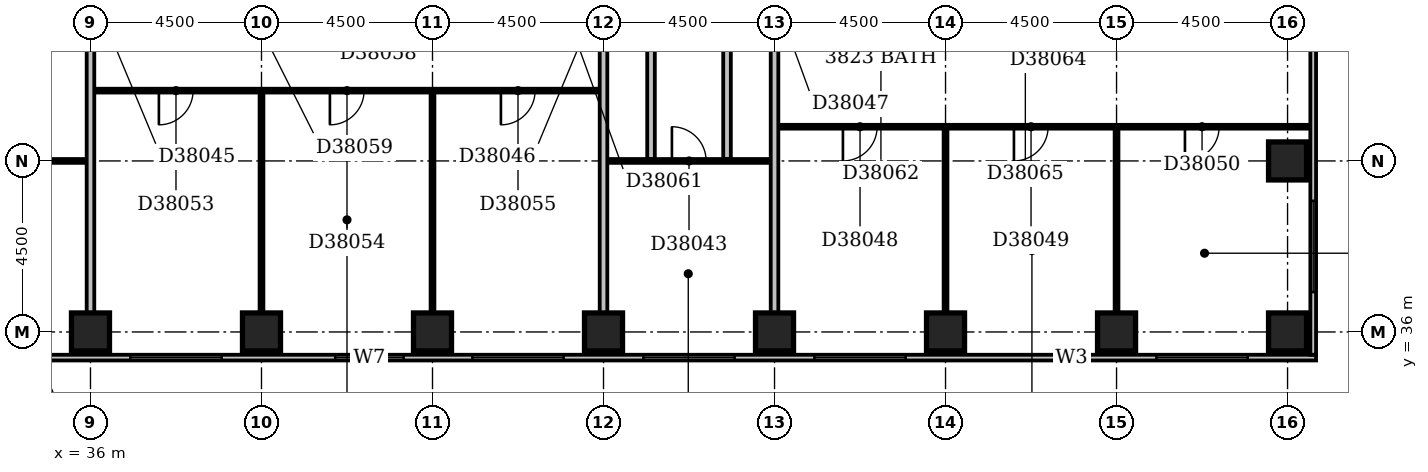
"""IFC4 building model, lengths in metres.
Left out: names, types, materials, properties, quantities, classifications, styles, units other than length and angle.
Written with IfcOpenShell. Run it as: python <this file> out.ifc"""

import sys

from ifc_helpers import new_model, si_unit, direction, frame, frame_2d, origin, origin_2d, place, context, subcontext, project, spatial, rectangle, extrude, element, fill, save


model = new_model("IFC4")
c1 = context("Model", 3, precision=1e-05, world=origin(), true_north=direction((0.0, 1.0)))
c2 = subcontext(c1, "Body", "Model", "MODEL_VIEW")
j1 = project(units=[si_unit("LENGTHUNIT", "METRE"), si_unit("PLANEANGLEUNIT", "RADIAN")], contexts=[c1])
p1 = place(None, origin())
s1 = spatial("IfcSite", under=j1, at=p1, CompositionType="ELEMENT")
p2 = place(p1, origin())
s2 = spatial("IfcBuilding", under=s1, at=p2, CompositionType="ELEMENT")
p3 = place(p2, frame((0.0, 0.0, 152.0)))
s3 = spatial("IfcBuildingStorey", under=s2, at=p3, CompositionType="ELEMENT", Elevation=152.0)
for number, where, z_axis, x_axis in (
    (1, (36.0, 36.0, -0.3), (0.0, 0.0, 1.0), (1.0, 0.0, 0.0)),
    (2, (40.5, 36.0, -0.3), (0.0, 0.0, 1.0), (1.0, 0.0, 0.0)),
    (3, (45.0, 36.0, -0.3), (0.0, 0.0, 1.0), (1.0, 0.0, 0.0)),
    (4, (49.5, 36.0, -0.3), (0.0, 0.0, 1.0), (1.0, 0.0, 0.0)),
    (5, (54.0, 36.0, -0.3), (0.0, 0.0, 1.0), (1.0, 0.0, 0.0)),
    (6, (58.5, 36.0, -0.3), (0.0, 0.0, 1.0), (1.0, 0.0, 0.0)),
    (7, (63.0, 36.0, -0.3), (0.0, 0.0, 1.0), (1.0, 0.0, 0.0)),
    (8, (67.5, 36.0, -0.3), (0.0, 0.0, 1.0), (1.0, 0.0, 0.0)),
    (9, (67.5, 40.5, -0.3), (0.0, 0.0, 1.0), (1.0, 0.0, 0.0)),
):
    element("IfcColumn", number, at=place(p3, frame(where, z_axis=z_axis, x_axis=x_axis)), inside=s3, PredefinedType="COLUMN", context=c2, shape_type="SweptSolid", body=[
        extrude(rectangle(XDim=1.0, YDim=1.0, at=origin_2d()), origin(), (0.0, 0.0, 1.0), 3.6),
    ])
p4 = place(p3, frame((23.1, 35.325, 0.0), z_axis=(0.0, 0.0, 1.0), x_axis=(1.0, 0.0, 0.0)))
e10 = element("IfcWall", 10, at=p4, inside=s3, PredefinedType="STANDARD", context=c2, shape_type="SweptSolid", body=[
    extrude(rectangle(XDim=45.15, YDim=0.15, at=frame_2d((22.575, 0.0))), origin(), (0.0, 0.0, 1.0), 2.7),
])
p5 = place(p4, frame((0.45, 0.0, 0.6)))
e11 = element("IfcOpeningElement", 11, at=p5, cuts=e10, PredefinedType="OPENING", context=c2, shape_type="SweptSolid", body=[
    extrude(rectangle(XDim=2.4, YDim=1.8, at=frame_2d((1.2, 0.9))), frame((0.0, 0.087, 0.0), z_axis=(0.0, -1.0, 0.0), x_axis=(1.0, 0.0, 0.0)), (0.0, 0.0, 1.0), 0.174),
])
p6 = place(p4, frame((4.738, 0.0, 0.6)))
e12 = element("IfcOpeningElement", 12, at=p6, cuts=e10, PredefinedType="OPENING", context=c2, shape_type="SweptSolid", body=[
    extrude(rectangle(XDim=2.1, YDim=1.8, at=frame_2d((1.05, 0.9))), frame((0.0, 0.087, 0.0), z_axis=(0.0, -1.0, 0.0), x_axis=(1.0, 0.0, 0.0)), (0.0, 0.0, 1.0), 0.174),
])
p7 = place(p4, frame((9.45, 0.0, 0.6)))
e13 = element("IfcOpeningElement", 13, at=p7, cuts=e10, PredefinedType="OPENING", context=c2, shape_type="SweptSolid", body=[
    extrude(rectangle(XDim=2.4, YDim=1.8, at=frame_2d((1.2, 0.9))), frame((0.0, 0.087, 0.0), z_axis=(0.0, -1.0, 0.0), x_axis=(1.0, 0.0, 0.0)), (0.0, 0.0, 1.0), 0.174),
])
p8 = place(p4, frame((13.95, 0.0, 0.6)))
e14 = element("IfcOpeningElement", 14, at=p8, cuts=e10, PredefinedType="OPENING", context=c2, shape_type="SweptSolid", body=[
    extrude(rectangle(XDim=2.4, YDim=1.8, at=frame_2d((1.2, 0.9))), frame((0.0, 0.087, 0.0), z_axis=(0.0, -1.0, 0.0), x_axis=(1.0, 0.0, 0.0)), (0.0, 0.0, 1.0), 0.174),
])
p9 = place(p4, frame((19.34, 0.0, 0.6)))
e15 = element("IfcOpeningElement", 15, at=p9, cuts=e10, PredefinedType="OPENING", context=c2, shape_type="SweptSolid", body=[
    extrude(rectangle(XDim=1.8, YDim=1.8, at=frame_2d((0.9, 0.9))), frame((0.0, 0.087, 0.0), z_axis=(0.0, -1.0, 0.0), x_axis=(1.0, 0.0, 0.0)), (0.0, 0.0, 1.0), 0.174),
])
p10 = place(p4, frame((22.95, 0.0, 0.6)))
e16 = element("IfcOpeningElement", 16, at=p10, cuts=e10, PredefinedType="OPENING", context=c2, shape_type="SweptSolid", body=[
    extrude(rectangle(XDim=2.4, YDim=1.8, at=frame_2d((1.2, 0.9))), frame((0.0, 0.087, 0.0), z_axis=(0.0, -1.0, 0.0), x_axis=(1.0, 0.0, 0.0)), (0.0, 0.0, 1.0), 0.174),
])
p11 = place(p4, frame((27.45, 0.0, 0.6)))
e17 = element("IfcOpeningElement", 17, at=p11, cuts=e10, PredefinedType="OPENING", context=c2, shape_type="SweptSolid", body=[
    extrude(rectangle(XDim=2.4, YDim=1.8, at=frame_2d((1.2, 0.9))), frame((0.0, 0.087, 0.0), z_axis=(0.0, -1.0, 0.0), x_axis=(1.0, 0.0, 0.0)), (0.0, 0.0, 1.0), 0.174),
])
p12 = place(p4, frame((31.95, 0.0, 0.6)))
e18 = element("IfcOpeningElement", 18, at=p12, cuts=e10, PredefinedType="OPENING", context=c2, shape_type="SweptSolid", body=[
    extrude(rectangle(XDim=2.4, YDim=1.8, at=frame_2d((1.2, 0.9))), frame((0.0, 0.087, 0.0), z_axis=(0.0, -1.0, 0.0), x_axis=(1.0, 0.0, 0.0)), (0.0, 0.0, 1.0), 0.174),
])
p13 = place(p4, frame((38.27, 0.0, 0.6)))
e19 = element("IfcOpeningElement", 19, at=p13, cuts=e10, PredefinedType="OPENING", context=c2, shape_type="SweptSolid", body=[
    extrude(rectangle(XDim=0.9, YDim=1.8, at=frame_2d((0.45, 0.9))), frame((0.0, 0.087, 0.0), z_axis=(0.0, -1.0, 0.0), x_axis=(1.0, 0.0, 0.0)), (0.0, 0.0, 1.0), 0.174),
])
p14 = place(p4, frame((40.95, 0.0, 0.6)))
e20 = element("IfcOpeningElement", 20, at=p14, cuts=e10, PredefinedType="OPENING", context=c2, shape_type="SweptSolid", body=[
    extrude(rectangle(XDim=2.4, YDim=1.8, at=frame_2d((1.2, 0.9))), frame((0.0, 0.087, 0.0), z_axis=(0.0, -1.0, 0.0), x_axis=(1.0, 0.0, 0.0)), (0.0, 0.0, 1.0), 0.174),
])
p15 = place(p3, frame((68.175, 35.4, 0.0), z_axis=(0.0, 0.0, 1.0), x_axis=(0.0, 1.0, 0.0)))
e21 = element("IfcWall", 21, at=p15, inside=s3, PredefinedType="STANDARD", context=c2, shape_type="SweptSolid", body=[
    extrude(rectangle(XDim=23.85, YDim=0.15, at=frame_2d((11.925, 0.0))), origin(), (0.0, 0.0, 1.0), 2.7),
])
p16 = place(p15, frame((1.65, 0.0, 0.6)))
e22 = element("IfcOpeningElement", 22, at=p16, cuts=e21, PredefinedType="OPENING", context=c2, shape_type="SweptSolid", body=[
    extrude(rectangle(XDim=2.4, YDim=1.8, at=frame_2d((1.2, 0.9))), frame((0.0, 0.087, 0.0), z_axis=(0.0, -1.0, 0.0), x_axis=(1.0, 0.0, 0.0)), (0.0, 0.0, 1.0), 0.174),
])
p17 = place(p15, frame((10.65, 0.0, 0.6)))
e23 = element("IfcOpeningElement", 23, at=p17, cuts=e21, PredefinedType="OPENING", context=c2, shape_type="SweptSolid", body=[
    extrude(rectangle(XDim=2.4, YDim=1.8, at=frame_2d((1.2, 0.9))), frame((0.0, 0.087, 0.0), z_axis=(0.0, -1.0, 0.0), x_axis=(1.0, 0.0, 0.0)), (0.0, 0.0, 1.0), 0.174),
])
p18 = place(p15, frame((19.65, 0.0, 0.6)))
e24 = element("IfcOpeningElement", 24, at=p18, cuts=e21, PredefinedType="OPENING", context=c2, shape_type="SweptSolid", body=[
    extrude(rectangle(XDim=2.4, YDim=1.8, at=frame_2d((1.2, 0.9))), frame((0.0, 0.087, 0.0), z_axis=(0.0, -1.0, 0.0), x_axis=(1.0, 0.0, 0.0)), (0.0, 0.0, 1.0), 0.174),
])
p19 = place(p3, frame((36.0, 36.5, 0.0), z_axis=(0.0, 0.0, 1.0), x_axis=(0.0, 1.0, 0.0)))
e25 = element("IfcWall", 25, at=p19, inside=s3, PredefinedType="PARTITIONING", context=c2, shape_type="SweptSolid", body=[
    extrude(rectangle(XDim=12.9, YDim=0.2, at=frame_2d((6.45, 0.0))), origin(), (0.0, 0.0, 1.0), 2.4),
])
p20 = place(p3, frame((40.5, 36.5, 0.0), z_axis=(0.0, 0.0, 1.0), x_axis=(0.0, 1.0, 0.0)))
e26 = element("IfcWall", 26, at=p20, inside=s3, PredefinedType="PARTITIONING", context=c2, shape_type="SweptSolid", body=[
    extrude(rectangle(XDim=5.8, YDim=0.1, at=frame_2d((2.9, 0.0))), origin(), (0.0, 0.0, 1.0), 3.3),
])
p21 = place(p3, frame((45.0, 36.5, 0.0), z_axis=(0.0, 0.0, 1.0), x_axis=(0.0, 1.0, 0.0)))
e27 = element("IfcWall", 27, at=p21, inside=s3, PredefinedType="PARTITIONING", context=c2, shape_type="SweptSolid", body=[
    extrude(rectangle(XDim=5.8, YDim=0.1, at=frame_2d((2.9, 0.0))), origin(), (0.0, 0.0, 1.0), 2.6),
])
p22 = place(p3, frame((49.5, 36.5, 0.0), z_axis=(0.0, 0.0, 1.0), x_axis=(0.0, 1.0, 0.0)))
e28 = element("IfcWall", 28, at=p22, inside=s3, PredefinedType="PARTITIONING", context=c2, shape_type="SweptSolid", body=[
    extrude(rectangle(XDim=12.9, YDim=0.2, at=frame_2d((6.45, 0.0))), origin(), (0.0, 0.0, 1.0), 3.3),
])
p23 = place(p3, frame((54.0, 36.5, 0.0), z_axis=(0.0, 0.0, 1.0), x_axis=(0.0, 1.0, 0.0)))
e29 = element("IfcWall", 29, at=p23, inside=s3, PredefinedType="PARTITIONING", context=c2, shape_type="SweptSolid", body=[
    extrude(rectangle(XDim=12.9, YDim=0.2, at=frame_2d((6.45, 0.0))), origin(), (0.0, 0.0, 1.0), 2.6),
])
p24 = place(p3, frame((58.5, 36.5, 0.0), z_axis=(0.0, 0.0, 1.0), x_axis=(0.0, 1.0, 0.0)))
e30 = element("IfcWall", 30, at=p24, inside=s3, PredefinedType="PARTITIONING", context=c2, shape_type="SweptSolid", body=[
    extrude(rectangle(XDim=4.85, YDim=0.1, at=frame_2d((2.425, 0.0))), origin(), (0.0, 0.0, 1.0), 3.3),
])
p25 = place(p3, frame((63.0, 36.5, 0.0), z_axis=(0.0, 0.0, 1.0), x_axis=(0.0, 1.0, 0.0)))
e31 = element("IfcWall", 31, at=p25, inside=s3, PredefinedType="PARTITIONING", context=c2, shape_type="SweptSolid", body=[
    extrude(rectangle(XDim=4.85, YDim=0.1, at=frame_2d((2.425, 0.0))), origin(), (0.0, 0.0, 1.0), 2.4),
])
p26 = place(p3, frame((31.6, 40.5, 0.0), z_axis=(0.0, 0.0, 1.0), x_axis=(1.0, 0.0, 0.0)))
e32 = element("IfcWall", 32, at=p26, inside=s3, PredefinedType="PARTITIONING", context=c2, shape_type="SweptSolid", body=[
    extrude(rectangle(XDim=4.3, YDim=0.1, at=frame_2d((2.15, 0.0))), origin(), (0.0, 0.0, 1.0), 3.3),
])
p27 = place(p26, frame((1.7, 0.0, 0.0)))
e33 = element("IfcOpeningElement", 33, at=p27, cuts=e32, PredefinedType="OPENING", context=c2, shape_type="SweptSolid", body=[
    extrude(rectangle(XDim=0.9, YDim=2.1, at=frame_2d((0.45, 1.05))), frame((0.0, 0.062, 0.0), z_axis=(0.0, -1.0, 0.0), x_axis=(1.0, 0.0, 0.0)), (0.0, 0.0, 1.0), 0.124),
])
p28 = place(p3, frame((49.6, 40.5, 0.0), z_axis=(0.0, 0.0, 1.0), x_axis=(1.0, 0.0, 0.0)))
e34 = element("IfcWall", 34, at=p28, inside=s3, PredefinedType="PARTITIONING", context=c2, shape_type="SweptSolid", body=[
    extrude(rectangle(XDim=4.3, YDim=0.1, at=frame_2d((2.15, 0.0))), origin(), (0.0, 0.0, 1.0), 3.3),
])
p29 = place(p28, frame((1.7, 0.0, 0.0)))
e35 = element("IfcOpeningElement", 35, at=p29, cuts=e34, PredefinedType="OPENING", context=c2, shape_type="SweptSolid", body=[
    extrude(rectangle(XDim=0.9, YDim=2.1, at=frame_2d((0.45, 1.05))), frame((0.0, 0.062, 0.0), z_axis=(0.0, -1.0, 0.0), x_axis=(1.0, 0.0, 0.0)), (0.0, 0.0, 1.0), 0.124),
])
p30 = place(p3, frame((50.75, 40.55, 0.0), z_axis=(0.0, 0.0, 1.0), x_axis=(0.0, 1.0, 0.0)))
e36 = element("IfcWall", 36, at=p30, inside=s3, PredefinedType="PARTITIONING", context=c2, shape_type="SweptSolid", body=[
    extrude(rectangle(XDim=8.95, YDim=0.2, at=frame_2d((4.475, 0.0))), origin(), (0.0, 0.0, 1.0), 3.3),
])
p31 = place(p30, frame((5.55, 0.0, 0.0)))
e37 = element("IfcOpeningElement", 37, at=p31, cuts=e36, PredefinedType="OPENING", context=c2, shape_type="SweptSolid", body=[
    extrude(rectangle(XDim=0.8, YDim=2.1, at=frame_2d((0.4, 1.05))), frame((0.0, 0.112, 0.0), z_axis=(0.0, -1.0, 0.0), x_axis=(1.0, 0.0, 0.0)), (0.0, 0.0, 1.0), 0.224),
])
p32 = place(p3, frame((52.75, 40.55, 0.0), z_axis=(0.0, 0.0, 1.0), x_axis=(0.0, 1.0, 0.0)))
e38 = element("IfcWall", 38, at=p32, inside=s3, PredefinedType="PARTITIONING", context=c2, shape_type="SweptSolid", body=[
    extrude(rectangle(XDim=8.95, YDim=0.2, at=frame_2d((4.475, 0.0))), origin(), (0.0, 0.0, 1.0), 3.3),
])
p33 = place(p32, frame((5.55, 0.0, 0.0)))
e39 = element("IfcOpeningElement", 39, at=p33, cuts=e38, PredefinedType="OPENING", context=c2, shape_type="SweptSolid", body=[
    extrude(rectangle(XDim=0.8, YDim=2.1, at=frame_2d((0.4, 1.05))), frame((0.0, 0.112, 0.0), z_axis=(0.0, -1.0, 0.0), x_axis=(1.0, 0.0, 0.0)), (0.0, 0.0, 1.0), 0.224),
])
p34 = place(p3, frame((54.1, 41.4, 0.0), z_axis=(0.0, 0.0, 1.0), x_axis=(1.0, 0.0, 0.0)))
e40 = element("IfcWall", 40, at=p34, inside=s3, PredefinedType="PARTITIONING", context=c2, shape_type="SweptSolid", body=[
    extrude(rectangle(XDim=14.0, YDim=0.1, at=frame_2d((7.0, 0.0))), origin(), (0.0, 0.0, 1.0), 3.3),
])
p35 = place(p34, frame((1.7, 0.0, 0.0)))
e41 = element("IfcOpeningElement", 41, at=p35, cuts=e40, PredefinedType="OPENING", context=c2, shape_type="SweptSolid", body=[
    extrude(rectangle(XDim=0.9, YDim=2.1, at=frame_2d((0.45, 1.05))), frame((0.0, 0.062, 0.0), z_axis=(0.0, -1.0, 0.0), x_axis=(1.0, 0.0, 0.0)), (0.0, 0.0, 1.0), 0.124),
])
p36 = place(p34, frame((6.2, 0.0, 0.0)))
e42 = element("IfcOpeningElement", 42, at=p36, cuts=e40, PredefinedType="OPENING", context=c2, shape_type="SweptSolid", body=[
    extrude(rectangle(XDim=0.9, YDim=2.1, at=frame_2d((0.45, 1.05))), frame((0.0, 0.062, 0.0), z_axis=(0.0, -1.0, 0.0), x_axis=(1.0, 0.0, 0.0)), (0.0, 0.0, 1.0), 0.124),
])
p37 = place(p34, frame((10.7, 0.0, 0.0)))
e43 = element("IfcOpeningElement", 43, at=p37, cuts=e40, PredefinedType="OPENING", context=c2, shape_type="SweptSolid", body=[
    extrude(rectangle(XDim=0.9, YDim=2.1, at=frame_2d((0.45, 1.05))), frame((0.0, 0.062, 0.0), z_axis=(0.0, -1.0, 0.0), x_axis=(1.0, 0.0, 0.0)), (0.0, 0.0, 1.0), 0.124),
])
p38 = place(p3, frame((36.1, 42.35, 0.0), z_axis=(0.0, 0.0, 1.0), x_axis=(1.0, 0.0, 0.0)))
e44 = element("IfcWall", 44, at=p38, inside=s3, PredefinedType="PARTITIONING", context=c2, shape_type="SweptSolid", body=[
    extrude(rectangle(XDim=13.3, YDim=0.1, at=frame_2d((6.65, 0.0))), origin(), (0.0, 0.0, 1.0), 3.3),
])
p39 = place(p38, frame((1.7, 0.0, 0.0)))
e45 = element("IfcOpeningElement", 45, at=p39, cuts=e44, PredefinedType="OPENING", context=c2, shape_type="SweptSolid", body=[
    extrude(rectangle(XDim=0.9, YDim=2.1, at=frame_2d((0.45, 1.05))), frame((0.0, 0.062, 0.0), z_axis=(0.0, -1.0, 0.0), x_axis=(1.0, 0.0, 0.0)), (0.0, 0.0, 1.0), 0.124),
])
p40 = place(p38, frame((6.2, 0.0, 0.0)))
e46 = element("IfcOpeningElement", 46, at=p40, cuts=e44, PredefinedType="OPENING", context=c2, shape_type="SweptSolid", body=[
    extrude(rectangle(XDim=0.9, YDim=2.1, at=frame_2d((0.45, 1.05))), frame((0.0, 0.062, 0.0), z_axis=(0.0, -1.0, 0.0), x_axis=(1.0, 0.0, 0.0)), (0.0, 0.0, 1.0), 0.124),
])
p41 = place(p38, frame((10.7, 0.0, 0.0)))
e47 = element("IfcOpeningElement", 47, at=p41, cuts=e44, PredefinedType="OPENING", context=c2, shape_type="SweptSolid", body=[
    extrude(rectangle(XDim=0.9, YDim=2.1, at=frame_2d((0.45, 1.05))), frame((0.0, 0.062, 0.0), z_axis=(0.0, -1.0, 0.0), x_axis=(1.0, 0.0, 0.0)), (0.0, 0.0, 1.0), 0.124),
])
p42 = place(p8, origin())
e48 = element("IfcWindow", 48, at=p42, inside=s3, PartitioningType="SINGLE_PANEL", PredefinedType="WINDOW", context=c2, shape_type="SweptSolid", body=[
    extrude(rectangle(XDim=2.4, YDim=1.8, at=frame_2d((1.2, 0.9))), frame((0.0, 0.03, 0.0), z_axis=(0.0, -1.0, 0.0), x_axis=(1.0, 0.0, 0.0)), (0.0, 0.0, 1.0), 0.06),
])
fill(e14, e48)
p43 = place(p9, origin())
e49 = element("IfcWindow", 49, at=p43, inside=s3, PartitioningType="SINGLE_PANEL", PredefinedType="WINDOW", context=c2, shape_type="SweptSolid", body=[
    extrude(rectangle(XDim=1.8, YDim=1.8, at=frame_2d((0.9, 0.9))), frame((0.0, 0.03, 0.0), z_axis=(0.0, -1.0, 0.0), x_axis=(1.0, 0.0, 0.0)), (0.0, 0.0, 1.0), 0.06),
])
fill(e15, e49)
p44 = place(p10, origin())
e50 = element("IfcWindow", 50, at=p44, inside=s3, PartitioningType="SINGLE_PANEL", PredefinedType="WINDOW", context=c2, shape_type="SweptSolid", body=[
    extrude(rectangle(XDim=2.4, YDim=1.8, at=frame_2d((1.2, 0.9))), frame((0.0, 0.03, 0.0), z_axis=(0.0, -1.0, 0.0), x_axis=(1.0, 0.0, 0.0)), (0.0, 0.0, 1.0), 0.06),
])
fill(e16, e50)
p45 = place(p11, origin())
e51 = element("IfcWindow", 51, at=p45, inside=s3, PartitioningType="SINGLE_PANEL", PredefinedType="WINDOW", context=c2, shape_type="SweptSolid", body=[
    extrude(rectangle(XDim=2.4, YDim=1.8, at=frame_2d((1.2, 0.9))), frame((0.0, 0.03, 0.0), z_axis=(0.0, -1.0, 0.0), x_axis=(1.0, 0.0, 0.0)), (0.0, 0.0, 1.0), 0.06),
])
fill(e17, e51)
p46 = place(p12, origin())
e52 = element("IfcWindow", 52, at=p46, inside=s3, PartitioningType="SINGLE_PANEL", PredefinedType="WINDOW", context=c2, shape_type="SweptSolid", body=[
    extrude(rectangle(XDim=2.4, YDim=1.8, at=frame_2d((1.2, 0.9))), frame((0.0, 0.03, 0.0), z_axis=(0.0, -1.0, 0.0), x_axis=(1.0, 0.0, 0.0)), (0.0, 0.0, 1.0), 0.06),
])
fill(e18, e52)
p47 = place(p13, origin())
e53 = element("IfcWindow", 53, at=p47, inside=s3, PartitioningType="SINGLE_PANEL", PredefinedType="WINDOW", context=c2, shape_type="SweptSolid", body=[
    extrude(rectangle(XDim=0.9, YDim=1.8, at=frame_2d((0.45, 0.9))), frame((0.0, 0.03, 0.0), z_axis=(0.0, -1.0, 0.0), x_axis=(1.0, 0.0, 0.0)), (0.0, 0.0, 1.0), 0.06),
])
fill(e19, e53)
p48 = place(p14, origin())
e54 = element("IfcWindow", 54, at=p48, inside=s3, PartitioningType="SINGLE_PANEL", PredefinedType="WINDOW", context=c2, shape_type="SweptSolid", body=[
    extrude(rectangle(XDim=2.4, YDim=1.8, at=frame_2d((1.2, 0.9))), frame((0.0, 0.03, 0.0), z_axis=(0.0, -1.0, 0.0), x_axis=(1.0, 0.0, 0.0)), (0.0, 0.0, 1.0), 0.06),
])
fill(e20, e54)
p49 = place(p16, origin())
e55 = element("IfcWindow", 55, at=p49, inside=s3, PartitioningType="SINGLE_PANEL", PredefinedType="WINDOW", context=c2, shape_type="SweptSolid", body=[
    extrude(rectangle(XDim=2.4, YDim=1.8, at=frame_2d((1.2, 0.9))), frame((0.0, 0.03, 0.0), z_axis=(0.0, -1.0, 0.0), x_axis=(1.0, 0.0, 0.0)), (0.0, 0.0, 1.0), 0.06),
])
fill(e22, e55)
p50 = place(p29, origin())
e56 = element("IfcDoor", 56, at=p50, inside=s3, OperationType="SINGLE_SWING_LEFT", PredefinedType="DOOR", context=c2, shape_type="SweptSolid", body=[
    extrude(rectangle(XDim=0.9, YDim=2.1, at=frame_2d((0.45, 1.05))), frame((0.0, 0.025, 0.0), z_axis=(0.0, -1.0, 0.0), x_axis=(1.0, 0.0, 0.0)), (0.0, 0.0, 1.0), 0.05),
])
fill(e35, e56)
p51 = place(p35, frame((0.9, 0.0, 0.0), z_axis=(0.0, 0.0, 1.0), x_axis=(-1.0, 0.0, 0.0)))
e57 = element("IfcDoor", 57, at=p51, inside=s3, OperationType="SINGLE_SWING_RIGHT", PredefinedType="DOOR", context=c2, shape_type="SweptSolid", body=[
    extrude(rectangle(XDim=0.9, YDim=2.1, at=frame_2d((0.45, 1.05))), frame((0.0, 0.025, 0.0), z_axis=(0.0, -1.0, 0.0), x_axis=(1.0, 0.0, 0.0)), (0.0, 0.0, 1.0), 0.05),
])
fill(e41, e57)
p52 = place(p36, frame((0.9, 0.0, 0.0), z_axis=(0.0, 0.0, 1.0), x_axis=(-1.0, 0.0, 0.0)))
e58 = element("IfcDoor", 58, at=p52, inside=s3, OperationType="SINGLE_SWING_RIGHT", PredefinedType="DOOR", context=c2, shape_type="SweptSolid", body=[
    extrude(rectangle(XDim=0.9, YDim=2.1, at=frame_2d((0.45, 1.05))), frame((0.0, 0.025, 0.0), z_axis=(0.0, -1.0, 0.0), x_axis=(1.0, 0.0, 0.0)), (0.0, 0.0, 1.0), 0.05),
])
fill(e42, e58)
p53 = place(p37, frame((0.9, 0.0, 0.0), z_axis=(0.0, 0.0, 1.0), x_axis=(-1.0, 0.0, 0.0)))
e59 = element("IfcDoor", 59, at=p53, inside=s3, OperationType="SINGLE_SWING_RIGHT", PredefinedType="DOOR", context=c2, shape_type="SweptSolid", body=[
    extrude(rectangle(XDim=0.9, YDim=2.1, at=frame_2d((0.45, 1.05))), frame((0.0, 0.025, 0.0), z_axis=(0.0, -1.0, 0.0), x_axis=(1.0, 0.0, 0.0)), (0.0, 0.0, 1.0), 0.05),
])
fill(e43, e59)
p54 = place(p39, frame((0.9, 0.0, 0.0), z_axis=(0.0, 0.0, 1.0), x_axis=(-1.0, 0.0, 0.0)))
e60 = element("IfcDoor", 60, at=p54, inside=s3, OperationType="SINGLE_SWING_RIGHT", PredefinedType="DOOR", context=c2, shape_type="SweptSolid", body=[
    extrude(rectangle(XDim=0.9, YDim=2.1, at=frame_2d((0.45, 1.05))), frame((0.0, 0.025, 0.0), z_axis=(0.0, -1.0, 0.0), x_axis=(1.0, 0.0, 0.0)), (0.0, 0.0, 1.0), 0.05),
])
fill(e45, e60)
p55 = place(p40, frame((0.9, 0.0, 0.0), z_axis=(0.0, 0.0, 1.0), x_axis=(-1.0, 0.0, 0.0)))
e61 = element("IfcDoor", 61, at=p55, inside=s3, OperationType="SINGLE_SWING_RIGHT", PredefinedType="DOOR", context=c2, shape_type="SweptSolid", body=[
    extrude(rectangle(XDim=0.9, YDim=2.1, at=frame_2d((0.45, 1.05))), frame((0.0, 0.025, 0.0), z_axis=(0.0, -1.0, 0.0), x_axis=(1.0, 0.0, 0.0)), (0.0, 0.0, 1.0), 0.05),
])
fill(e46, e61)
p56 = place(p41, frame((0.9, 0.0, 0.0), z_axis=(0.0, 0.0, 1.0), x_axis=(-1.0, 0.0, 0.0)))
e62 = element("IfcDoor", 62, at=p56, inside=s3, OperationType="SINGLE_SWING_RIGHT", PredefinedType="DOOR", context=c2, shape_type="SweptSolid", body=[
    extrude(rectangle(XDim=0.9, YDim=2.1, at=frame_2d((0.45, 1.05))), frame((0.0, 0.025, 0.0), z_axis=(0.0, -1.0, 0.0), x_axis=(1.0, 0.0, 0.0)), (0.0, 0.0, 1.0), 0.05),
])
fill(e47, e62)
save(model, sys.argv[1])
